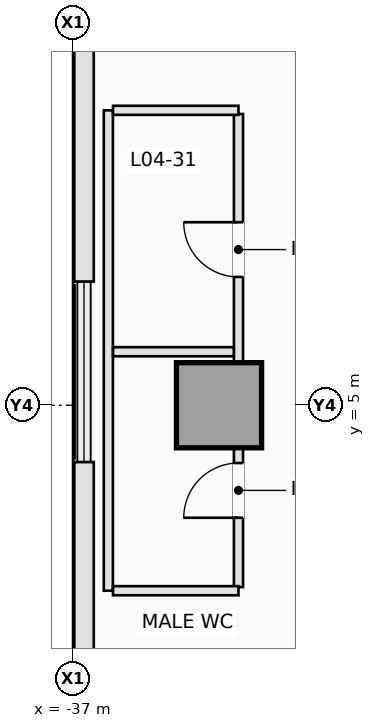
"""IFC4 building model, lengths in metres.
Left out: names, types, materials, properties, quantities, classifications, styles, units other than length and angle.
Written with IfcOpenShell. Run it as: python <this file> out.ifc"""

import sys

from ifc_helpers import new_model, si_unit, direction, frame, frame_2d, origin, origin_2d, place, context, subcontext, project, spatial, rectangle, extrude, element, fill, save


model = new_model("IFC4")
c1 = context("Model", 3, precision=1e-05, world=origin(), true_north=direction((0.0, 1.0)))
c2 = subcontext(c1, "Body", "Model", "MODEL_VIEW")
j1 = project(units=[si_unit("LENGTHUNIT", "METRE"), si_unit("PLANEANGLEUNIT", "RADIAN")], contexts=[c1])
p1 = place(None, origin())
s1 = spatial("IfcSite", under=j1, at=p1, CompositionType="ELEMENT")
p2 = place(p1, origin())
s2 = spatial("IfcBuilding", under=s1, at=p2, CompositionType="ELEMENT")
p3 = place(p2, frame((0.0, 0.0, 18.5)))
s3 = spatial("IfcBuildingStorey", under=s2, at=p3, CompositionType="ELEMENT", Elevation=18.5)
p4 = place(p3, frame((-34.6, 5.0, 0.0), z_axis=(0.0, 0.0, 1.0), x_axis=(1.0, 0.0, 0.0)))
e1 = element("IfcColumn", 1, at=p4, inside=s3, PredefinedType="COLUMN", context=c2, shape_type="SweptSolid", body=[
    extrude(rectangle(XDim=1.4, YDim=1.4, at=origin_2d()), origin(), (0.0, 0.0, 1.0), 4.5),
])
p5 = place(p3, frame((-36.82, -4.065, 0.0), z_axis=(0.0, 0.0, 1.0), x_axis=(0.0, 1.0, 0.0)))
e2 = element("IfcWall", 2, at=p5, inside=s3, PredefinedType="STANDARD", context=c2, shape_type="SweptSolid", body=[
    extrude(rectangle(XDim=8.131, YDim=0.32, at=frame_2d((4.065, 0.0))), origin(), (0.0, 0.0, 1.0), 4.08),
])
p6 = place(p3, frame((-36.82, 7.035, 0.0), z_axis=(0.0, 0.0, 1.0), x_axis=(0.0, 1.0, 0.0)))
e3 = element("IfcWall", 3, at=p6, inside=s3, PredefinedType="STANDARD", context=c2, shape_type="SweptSolid", body=[
    extrude(rectangle(XDim=8.131, YDim=0.32, at=frame_2d((4.065, 0.0))), origin(), (0.0, 0.0, 1.0), 4.08),
])
p7 = place(p3, frame((-36.42, 1.95, 0.0), z_axis=(0.0, 0.0, 1.0), x_axis=(0.0, 1.0, 0.0)))
e4 = element("IfcWall", 4, at=p7, inside=s3, PredefinedType="PARTITIONING", context=c2, shape_type="SweptSolid", body=[
    extrude(rectangle(XDim=7.9, YDim=0.15, at=frame_2d((3.95, 0.0))), origin(), (0.0, 0.0, 1.0), 4.08),
])
p8 = place(p3, frame((-34.28, 2.01, 0.0), z_axis=(0.0, 0.0, 1.0), x_axis=(0.0, 1.0, 0.0)))
e5 = element("IfcWall", 5, at=p8, inside=s3, PredefinedType="PARTITIONING", context=c2, shape_type="SweptSolid", body=[
    extrude(rectangle(XDim=2.288, YDim=0.15, at=frame_2d((1.144, 0.0))), origin(), (0.0, 0.0, 1.0), 4.08),
])
p9 = place(p8, frame((1.14, 0.0, 0.0)))
e6 = element("IfcOpeningElement", 6, at=p9, cuts=e5, PredefinedType="OPENING", context=c2, shape_type="SweptSolid", body=[
    extrude(rectangle(XDim=0.9, YDim=2.12, at=frame_2d((0.45, 1.06))), frame((0.0, 0.085, 0.0), z_axis=(0.0, -1.0, 0.0), x_axis=(1.0, 0.0, 0.0)), (0.0, 0.0, 1.0), 0.17),
])
p10 = place(p3, frame((-34.28, 5.702, 0.0), z_axis=(0.0, 0.0, 1.0), x_axis=(0.0, 1.0, 0.0)))
e7 = element("IfcWall", 7, at=p10, inside=s3, PredefinedType="PARTITIONING", context=c2, shape_type="SweptSolid", body=[
    extrude(rectangle(XDim=4.088, YDim=0.15, at=frame_2d((2.044, 0.0))), origin(), (0.0, 0.0, 1.0), 4.08),
])
p11 = place(p10, frame((1.408, 0.0, 0.0)))
e8 = element("IfcOpeningElement", 8, at=p11, cuts=e7, PredefinedType="OPENING", context=c2, shape_type="SweptSolid", body=[
    extrude(rectangle(XDim=0.9, YDim=2.12, at=frame_2d((0.45, 1.06))), frame((0.0, 0.085, 0.0), z_axis=(0.0, -1.0, 0.0), x_axis=(1.0, 0.0, 0.0)), (0.0, 0.0, 1.0), 0.17),
])
p12 = place(p3, frame((-36.343, 5.88, 0.0), z_axis=(0.0, 0.0, 1.0), x_axis=(1.0, 0.0, 0.0)))
e9 = element("IfcWall", 9, at=p12, inside=s3, PredefinedType="PARTITIONING", context=c2, shape_type="SweptSolid", body=[
    extrude(rectangle(XDim=1.986, YDim=0.15, at=frame_2d((0.993, 0.0))), origin(), (0.0, 0.0, 1.0), 4.08),
])
for number, where, z_axis, x_axis in (
    (10, (-36.343, 1.95, 0.0), (0.0, 0.0, 1.0), (1.0, 0.0, 0.0)),
    (11, (-36.343, 9.85, 0.0), (0.0, 0.0, 1.0), (1.0, 0.0, 0.0)),
):
    element("IfcWall", number, at=place(p3, frame(where, z_axis=z_axis, x_axis=x_axis)), inside=s3, PredefinedType="PARTITIONING", context=c2, shape_type="SweptSolid", body=[
        extrude(rectangle(XDim=2.063, YDim=0.15, at=frame_2d((1.031, 0.0))), origin(), (0.0, 0.0, 1.0), 4.08),
    ])
p13 = place(p9, origin())
e12 = element("IfcDoor", 12, at=p13, inside=s3, OperationType="SINGLE_SWING_LEFT", PredefinedType="DOOR", context=c2, shape_type="SweptSolid", body=[
    extrude(rectangle(XDim=0.9, YDim=2.12, at=frame_2d((0.45, 1.06))), frame((0.0, 0.025, 0.0), z_axis=(0.0, -1.0, 0.0), x_axis=(1.0, 0.0, 0.0)), (0.0, 0.0, 1.0), 0.05),
])
fill(e6, e12)
p14 = place(p11, origin())
e13 = element("IfcDoor", 13, at=p14, inside=s3, OperationType="SINGLE_SWING_RIGHT", PredefinedType="DOOR", context=c2, shape_type="SweptSolid", body=[
    extrude(rectangle(XDim=0.9, YDim=2.12, at=frame_2d((0.45, 1.06))), frame((0.0, 0.025, 0.0), z_axis=(0.0, -1.0, 0.0), x_axis=(1.0, 0.0, 0.0)), (0.0, 0.0, 1.0), 0.05),
])
fill(e8, e13)
save(model, sys.argv[1])
